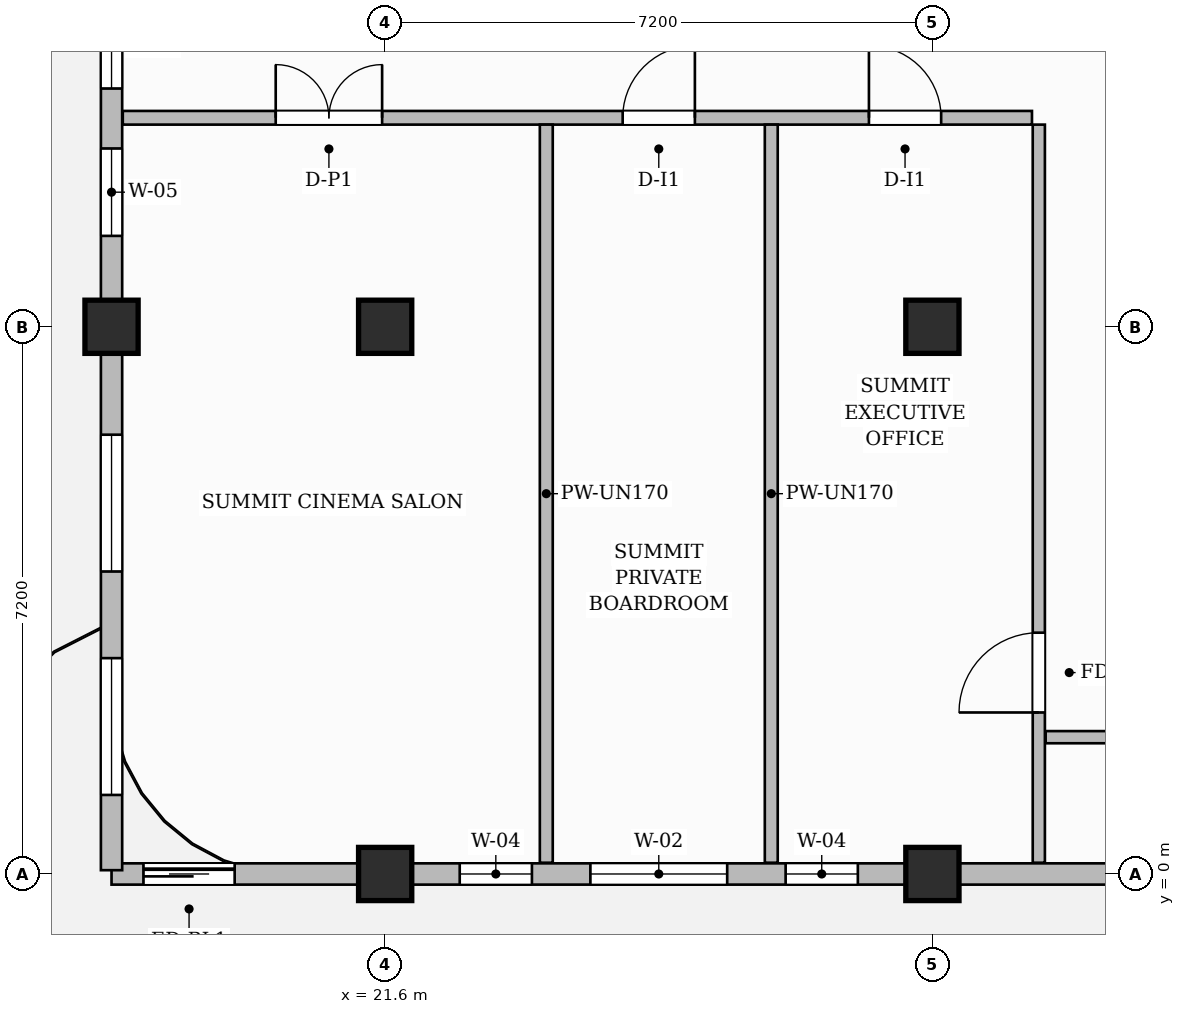
"""IFC4 building model, lengths in metres.
Left out: names, types, materials, properties, quantities, classifications, styles, units other than length and angle.
Written with IfcOpenShell. Run it as: python <this file> out.ifc"""

import sys

from ifc_helpers import new_model, si_unit, direction, frame, frame_2d, origin, origin_2d, place, context, subcontext, project, spatial, rectangle, extrude, source, transform, mapped, element, fill, save


model = new_model("IFC4")
c1 = context("Model", 3, precision=1e-05, world=origin(), true_north=direction((0.0, 1.0)))
c2 = subcontext(c1, "Body", "Model", "MODEL_VIEW")
j1 = project(units=[si_unit("LENGTHUNIT", "METRE"), si_unit("PLANEANGLEUNIT", "RADIAN")], contexts=[c1])
p1 = place(None, origin())
s1 = spatial("IfcSite", under=j1, at=p1, CompositionType="ELEMENT")
p2 = place(p1, origin())
s2 = spatial("IfcBuilding", under=s1, at=p2, CompositionType="ELEMENT")
p3 = place(p2, frame((0.0, 0.0, 275.05)))
s3 = spatial("IfcBuildingStorey", under=s2, at=p3, CompositionType="ELEMENT", Elevation=275.05)
m1 = source(origin(), c2, "Body", "SweptSolid", [
    extrude(rectangle(XDim=0.7, YDim=0.7, at=origin_2d()), origin(), (0.0, 0.0, 1.0), 3.85),
])
for number, where, z_axis, x_axis in (
    (1, (21.6, 0.0, 0.0), (0.0, 0.0, 1.0), (1.0, 0.0, 0.0)),
    (2, (21.6, 7.2, 0.0), (0.0, 0.0, 1.0), (1.0, 0.0, 0.0)),
    (3, (28.8, 0.0, 0.0), (0.0, 0.0, 1.0), (1.0, 0.0, 0.0)),
    (4, (28.8, 7.2, 0.0), (0.0, 0.0, 1.0), (1.0, 0.0, 0.0)),
    (5, (18.0, 7.2, 0.0), (0.0, 0.0, 1.0), (1.0, 0.0, 0.0)),
):
    element("IfcColumn", number, at=place(p3, frame(where, z_axis=z_axis, x_axis=x_axis)), inside=s3, PredefinedType="COLUMN", context=c2, shape_type="MappedRepresentation", body=[
        mapped(m1, transform((0.0, 0.0, 0.0), scale=1.0)),
    ])
p4 = place(p3, frame((18.148, 9.95, 0.0), z_axis=(0.0, 0.0, 1.0), x_axis=(1.0, 0.0, 0.0)))
e6 = element("IfcWall", 6, at=p4, inside=s3, PredefinedType="PARTITIONING", context=c2, shape_type="SweptSolid", body=[
    extrude(rectangle(XDim=11.962, YDim=0.18, at=frame_2d((5.981, 0.0))), origin(), (0.0, 0.0, 1.0), 3.6),
])
p5 = place(p4, frame((2.012, 0.0, 0.0)))
e7 = element("IfcOpeningElement", 7, at=p5, cuts=e6, PredefinedType="OPENING", context=c2, shape_type="SweptSolid", body=[
    extrude(rectangle(XDim=1.4, YDim=2.35, at=frame_2d((0.7, 1.175))), frame((0.0, 0.1, 0.0), z_axis=(0.0, -1.0, 0.0), x_axis=(1.0, 0.0, 0.0)), (0.0, 0.0, 1.0), 0.2),
])
p6 = place(p4, frame((6.577, 0.0, 0.0)))
e8 = element("IfcOpeningElement", 8, at=p6, cuts=e6, PredefinedType="OPENING", context=c2, shape_type="SweptSolid", body=[
    extrude(rectangle(XDim=0.95, YDim=2.15, at=frame_2d((0.475, 1.075))), frame((0.0, 0.1, 0.0), z_axis=(0.0, -1.0, 0.0), x_axis=(1.0, 0.0, 0.0)), (0.0, 0.0, 1.0), 0.2),
])
p7 = place(p4, frame((9.817, 0.0, 0.0)))
e9 = element("IfcOpeningElement", 9, at=p7, cuts=e6, PredefinedType="OPENING", context=c2, shape_type="SweptSolid", body=[
    extrude(rectangle(XDim=0.95, YDim=2.15, at=frame_2d((0.475, 1.075))), frame((0.0, 0.1, 0.0), z_axis=(0.0, -1.0, 0.0), x_axis=(1.0, 0.0, 0.0)), (0.0, 0.0, 1.0), 0.2),
])
p8 = place(p3, frame((30.2, 0.148, 0.0), z_axis=(0.0, 0.0, 1.0), x_axis=(0.0, 1.0, 0.0)))
e10 = element("IfcWall", 10, at=p8, inside=s3, PredefinedType="PARTITIONING", context=c2, shape_type="SweptSolid", body=[
    extrude(rectangle(XDim=9.712, YDim=0.16, at=frame_2d((4.856, 0.0))), origin(), (0.0, 0.0, 1.0), 3.6),
])
p9 = place(p8, frame((1.977, 0.0, 0.0)))
e11 = element("IfcOpeningElement", 11, at=p9, cuts=e10, PredefinedType="OPENING", context=c2, shape_type="SweptSolid", body=[
    extrude(rectangle(XDim=1.05, YDim=2.15, at=frame_2d((0.525, 1.075))), frame((0.0, 0.09, 0.0), z_axis=(0.0, -1.0, 0.0), x_axis=(1.0, 0.0, 0.0)), (0.0, 0.0, 1.0), 0.18),
])
p10 = place(p3, frame((30.29, 1.8, 0.0), z_axis=(0.0, 0.0, 1.0), x_axis=(1.0, 0.0, 0.0)))
e12 = element("IfcWall", 12, at=p10, inside=s3, PredefinedType="PARTITIONING", context=c2, shape_type="SweptSolid", body=[
    extrude(rectangle(XDim=19.37, YDim=0.16, at=frame_2d((9.685, 0.0))), origin(), (0.0, 0.0, 1.0), 3.6),
])
p11 = place(p10, frame((9.735, 0.0, 0.0)))
e13 = element("IfcOpeningElement", 13, at=p11, cuts=e12, PredefinedType="OPENING", context=c2, shape_type="SweptSolid", body=[
    extrude(rectangle(XDim=0.95, YDim=2.15, at=frame_2d((0.475, 1.075))), frame((0.0, 0.09, 0.0), z_axis=(0.0, -1.0, 0.0), x_axis=(1.0, 0.0, 0.0)), (0.0, 0.0, 1.0), 0.18),
])
for number, where, z_axis, x_axis in (
    (14, (23.72, 0.148, 0.0), (0.0, 0.0, 1.0), (0.0, 1.0, 0.0)),
    (15, (26.68, 0.148, 0.0), (0.0, 0.0, 1.0), (0.0, 1.0, 0.0)),
):
    element("IfcWall", number, at=place(p3, frame(where, z_axis=z_axis, x_axis=x_axis)), inside=s3, PredefinedType="PARTITIONING", context=c2, shape_type="SweptSolid", body=[
        extrude(rectangle(XDim=9.712, YDim=0.17, at=frame_2d((4.856, 0.0))), origin(), (0.0, 0.0, 1.0), 3.6),
    ])
p12 = place(p3, frame((18.0, 0.0, 0.0), z_axis=(0.0, 0.0, 1.0), x_axis=(1.0, 0.0, 0.0)))
e16 = element("IfcWall", 16, at=p12, inside=s3, PredefinedType="SOLIDWALL", context=c2, shape_type="SweptSolid", body=[
    extrude(rectangle(XDim=31.8, YDim=0.28, at=frame_2d((15.9, 0.0))), origin(), (0.0, 0.0, 1.0), 3.185),
])
p13 = place(p12, frame((0.42, 0.0, 0.0)))
e17 = element("IfcOpeningElement", 17, at=p13, cuts=e16, PredefinedType="OPENING", context=c2, shape_type="SweptSolid", body=[
    extrude(rectangle(XDim=1.2, YDim=2.2, at=frame_2d((0.6, 1.1))), frame((0.0, 0.15, 0.0), z_axis=(0.0, -1.0, 0.0), x_axis=(1.0, 0.0, 0.0)), (0.0, 0.0, 1.0), 0.3),
])
p14 = place(p12, frame((4.581, 0.0, 0.8)))
e18 = element("IfcOpeningElement", 18, at=p14, cuts=e16, PredefinedType="OPENING", context=c2, shape_type="SweptSolid", body=[
    extrude(rectangle(XDim=0.95, YDim=1.75, at=frame_2d((0.475, 0.875))), frame((0.0, 0.15, 0.0), z_axis=(0.0, -1.0, 0.0), x_axis=(1.0, 0.0, 0.0)), (0.0, 0.0, 1.0), 0.3),
])
p15 = place(p12, frame((6.3, 0.0, 0.8)))
e19 = element("IfcOpeningElement", 19, at=p15, cuts=e16, PredefinedType="OPENING", context=c2, shape_type="SweptSolid", body=[
    extrude(rectangle(XDim=1.8, YDim=1.85, at=frame_2d((0.9, 0.925))), frame((0.0, 0.15, 0.0), z_axis=(0.0, -1.0, 0.0), x_axis=(1.0, 0.0, 0.0)), (0.0, 0.0, 1.0), 0.3),
])
p16 = place(p12, frame((8.869, 0.0, 0.8)))
e20 = element("IfcOpeningElement", 20, at=p16, cuts=e16, PredefinedType="OPENING", context=c2, shape_type="SweptSolid", body=[
    extrude(rectangle(XDim=0.95, YDim=1.75, at=frame_2d((0.475, 0.875))), frame((0.0, 0.15, 0.0), z_axis=(0.0, -1.0, 0.0), x_axis=(1.0, 0.0, 0.0)), (0.0, 0.0, 1.0), 0.3),
])
p17 = place(p12, frame((13.204, 0.0, 0.8)))
e21 = element("IfcOpeningElement", 21, at=p17, cuts=e16, PredefinedType="OPENING", context=c2, shape_type="SweptSolid", body=[
    extrude(rectangle(XDim=1.8, YDim=1.85, at=frame_2d((0.9, 0.925))), frame((0.0, 0.15, 0.0), z_axis=(0.0, -1.0, 0.0), x_axis=(1.0, 0.0, 0.0)), (0.0, 0.0, 1.0), 0.3),
])
p18 = place(p12, frame((18.125, 0.0, 0.8)))
e22 = element("IfcOpeningElement", 22, at=p18, cuts=e16, PredefinedType="OPENING", context=c2, shape_type="SweptSolid", body=[
    extrude(rectangle(XDim=1.8, YDim=1.85, at=frame_2d((0.9, 0.925))), frame((0.0, 0.15, 0.0), z_axis=(0.0, -1.0, 0.0), x_axis=(1.0, 0.0, 0.0)), (0.0, 0.0, 1.0), 0.3),
])
p19 = place(p12, frame((20.875, 0.0, 0.8)))
e23 = element("IfcOpeningElement", 23, at=p19, cuts=e16, PredefinedType="OPENING", context=c2, shape_type="SweptSolid", body=[
    extrude(rectangle(XDim=1.8, YDim=1.85, at=frame_2d((0.9, 0.925))), frame((0.0, 0.15, 0.0), z_axis=(0.0, -1.0, 0.0), x_axis=(1.0, 0.0, 0.0)), (0.0, 0.0, 1.0), 0.3),
])
p20 = place(p12, frame((25.475, 0.0, 0.8)))
e24 = element("IfcOpeningElement", 24, at=p20, cuts=e16, PredefinedType="OPENING", context=c2, shape_type="SweptSolid", body=[
    extrude(rectangle(XDim=1.8, YDim=1.85, at=frame_2d((0.9, 0.925))), frame((0.0, 0.15, 0.0), z_axis=(0.0, -1.0, 0.0), x_axis=(1.0, 0.0, 0.0)), (0.0, 0.0, 1.0), 0.3),
])
p21 = place(p12, frame((28.525, 0.0, 0.8)))
e25 = element("IfcOpeningElement", 25, at=p21, cuts=e16, PredefinedType="OPENING", context=c2, shape_type="SweptSolid", body=[
    extrude(rectangle(XDim=1.8, YDim=1.85, at=frame_2d((0.9, 0.925))), frame((0.0, 0.15, 0.0), z_axis=(0.0, -1.0, 0.0), x_axis=(1.0, 0.0, 0.0)), (0.0, 0.0, 1.0), 0.3),
])
p22 = place(p3, frame((18.0, 0.05, 0.0), z_axis=(0.0, 0.0, 1.0), x_axis=(0.0, 1.0, 0.0)))
e26 = element("IfcWall", 26, at=p22, inside=s3, PredefinedType="SOLIDWALL", context=c2, shape_type="SweptSolid", body=[
    extrude(rectangle(XDim=21.5, YDim=0.28, at=frame_2d((10.75, 0.0))), origin(), (0.0, 0.0, 1.0), 3.6),
])
p23 = place(p22, frame((0.99, 0.0, 0.8)))
e27 = element("IfcOpeningElement", 27, at=p23, cuts=e26, PredefinedType="OPENING", context=c2, shape_type="SweptSolid", body=[
    extrude(rectangle(XDim=1.8, YDim=1.85, at=frame_2d((0.9, 0.925))), frame((0.0, 0.15, 0.0), z_axis=(0.0, -1.0, 0.0), x_axis=(1.0, 0.0, 0.0)), (0.0, 0.0, 1.0), 0.3),
])
p24 = place(p22, frame((3.93, 0.0, 0.8)))
e28 = element("IfcOpeningElement", 28, at=p24, cuts=e26, PredefinedType="OPENING", context=c2, shape_type="SweptSolid", body=[
    extrude(rectangle(XDim=1.8, YDim=1.85, at=frame_2d((0.9, 0.925))), frame((0.0, 0.15, 0.0), z_axis=(0.0, -1.0, 0.0), x_axis=(1.0, 0.0, 0.0)), (0.0, 0.0, 1.0), 0.3),
])
p25 = place(p22, frame((8.346, 0.0, 0.8)))
e29 = element("IfcOpeningElement", 29, at=p25, cuts=e26, PredefinedType="OPENING", context=c2, shape_type="SweptSolid", body=[
    extrude(rectangle(XDim=1.15, YDim=1.8, at=frame_2d((0.575, 0.9))), frame((0.0, 0.15, 0.0), z_axis=(0.0, -1.0, 0.0), x_axis=(1.0, 0.0, 0.0)), (0.0, 0.0, 1.0), 0.3),
])
p26 = place(p22, frame((10.285, 0.0, 0.8)))
e30 = element("IfcOpeningElement", 30, at=p26, cuts=e26, PredefinedType="OPENING", context=c2, shape_type="SweptSolid", body=[
    extrude(rectangle(XDim=1.15, YDim=1.8, at=frame_2d((0.575, 0.9))), frame((0.0, 0.15, 0.0), z_axis=(0.0, -1.0, 0.0), x_axis=(1.0, 0.0, 0.0)), (0.0, 0.0, 1.0), 0.3),
])
p27 = place(p22, frame((12.114, 0.0, 0.8)))
e31 = element("IfcOpeningElement", 31, at=p27, cuts=e26, PredefinedType="OPENING", context=c2, shape_type="SweptSolid", body=[
    extrude(rectangle(XDim=1.15, YDim=1.8, at=frame_2d((0.575, 0.9))), frame((0.0, 0.15, 0.0), z_axis=(0.0, -1.0, 0.0), x_axis=(1.0, 0.0, 0.0)), (0.0, 0.0, 1.0), 0.3),
])
p28 = place(p22, frame((15.406, 0.0, 0.8)))
e32 = element("IfcOpeningElement", 32, at=p28, cuts=e26, PredefinedType="OPENING", context=c2, shape_type="SweptSolid", body=[
    extrude(rectangle(XDim=1.15, YDim=1.8, at=frame_2d((0.575, 0.9))), frame((0.0, 0.15, 0.0), z_axis=(0.0, -1.0, 0.0), x_axis=(1.0, 0.0, 0.0)), (0.0, 0.0, 1.0), 0.3),
])
p29 = place(p22, frame((18.079, 0.0, 0.8)))
e33 = element("IfcOpeningElement", 33, at=p29, cuts=e26, PredefinedType="OPENING", context=c2, shape_type="SweptSolid", body=[
    extrude(rectangle(XDim=1.8, YDim=1.85, at=frame_2d((0.9, 0.925))), frame((0.0, 0.15, 0.0), z_axis=(0.0, -1.0, 0.0), x_axis=(1.0, 0.0, 0.0)), (0.0, 0.0, 1.0), 0.3),
])
m2 = source(origin(), c2, "Body", "SweptSolid", [
    extrude(rectangle(XDim=1.05, YDim=2.15, at=frame_2d((0.525, 1.075))), frame((0.0, 0.025, 0.0), z_axis=(0.0, -1.0, 0.0), x_axis=(1.0, 0.0, 0.0)), (0.0, 0.0, 1.0), 0.05),
])
p30 = place(p9, origin())
e34 = element("IfcDoor", 34, at=p30, inside=s3, OperationType="SINGLE_SWING_LEFT", PredefinedType="DOOR", context=c2, shape_type="MappedRepresentation", body=[
    mapped(m2, transform((0.0, 0.0, 0.0), scale=1.0)),
])
fill(e11, e34)
m3 = source(origin(), c2, "Body", "SweptSolid", [
    extrude(rectangle(XDim=1.4, YDim=2.35, at=frame_2d((0.7, 1.175))), frame((0.0, 0.025, 0.0), z_axis=(0.0, -1.0, 0.0), x_axis=(1.0, 0.0, 0.0)), (0.0, 0.0, 1.0), 0.05),
])
p31 = place(p5, origin())
e35 = element("IfcDoor", 35, at=p31, inside=s3, OperationType="DOUBLE_DOOR_SINGLE_SWING", PredefinedType="DOOR", context=c2, shape_type="MappedRepresentation", body=[
    mapped(m3, transform((0.0, 0.0, 0.0), scale=1.0)),
])
fill(e7, e35)
m4 = source(origin(), c2, "Body", "SweptSolid", [
    extrude(rectangle(XDim=0.95, YDim=2.15, at=frame_2d((0.475, 1.075))), frame((0.0, 0.025, 0.0), z_axis=(0.0, -1.0, 0.0), x_axis=(1.0, 0.0, 0.0)), (0.0, 0.0, 1.0), 0.05),
])
p32 = place(p6, origin())
e36 = element("IfcDoor", 36, at=p32, inside=s3, OperationType="SINGLE_SWING_RIGHT", PredefinedType="DOOR", context=c2, shape_type="MappedRepresentation", body=[
    mapped(m4, transform((0.0, 0.0, 0.0), scale=1.0)),
])
fill(e8, e36)
p33 = place(p7, origin())
e37 = element("IfcDoor", 37, at=p33, inside=s3, OperationType="SINGLE_SWING_LEFT", PredefinedType="DOOR", context=c2, shape_type="MappedRepresentation", body=[
    mapped(m4, transform((0.0, 0.0, 0.0), scale=1.0)),
])
fill(e9, e37)
m5 = source(origin(), c2, "Body", "SweptSolid", [
    extrude(rectangle(XDim=1.2, YDim=2.2, at=frame_2d((0.6, 1.1))), frame((0.0, 0.025, 0.0), z_axis=(0.0, -1.0, 0.0), x_axis=(1.0, 0.0, 0.0)), (0.0, 0.0, 1.0), 0.05),
])
p34 = place(p13, origin())
e38 = element("IfcDoor", 38, at=p34, inside=s3, OperationType="SLIDING_TO_LEFT", PredefinedType="DOOR", context=c2, shape_type="MappedRepresentation", body=[
    mapped(m5, transform((0.0, 0.0, 0.0), scale=1.0)),
])
fill(e17, e38)
m6 = source(origin(), c2, "Body", "SweptSolid", [
    extrude(rectangle(XDim=0.95, YDim=1.75, at=frame_2d((0.475, 0.875))), frame((0.0, 0.03, 0.0), z_axis=(0.0, -1.0, 0.0), x_axis=(1.0, 0.0, 0.0)), (0.0, 0.0, 1.0), 0.06),
])
p35 = place(p14, origin())
e39 = element("IfcWindow", 39, at=p35, inside=s3, PartitioningType="SINGLE_PANEL", PredefinedType="WINDOW", context=c2, shape_type="MappedRepresentation", body=[
    mapped(m6, transform((0.0, 0.0, 0.0), scale=1.0)),
])
fill(e18, e39)
m7 = source(origin(), c2, "Body", "SweptSolid", [
    extrude(rectangle(XDim=1.8, YDim=1.85, at=frame_2d((0.9, 0.925))), frame((0.0, 0.03, 0.0), z_axis=(0.0, -1.0, 0.0), x_axis=(1.0, 0.0, 0.0)), (0.0, 0.0, 1.0), 0.06),
])
p36 = place(p15, origin())
e40 = element("IfcWindow", 40, at=p36, inside=s3, PartitioningType="DOUBLE_PANEL_VERTICAL", PredefinedType="WINDOW", context=c2, shape_type="MappedRepresentation", body=[
    mapped(m7, transform((0.0, 0.0, 0.0), scale=1.0)),
])
fill(e19, e40)
p37 = place(p16, origin())
e41 = element("IfcWindow", 41, at=p37, inside=s3, PartitioningType="SINGLE_PANEL", PredefinedType="WINDOW", context=c2, shape_type="MappedRepresentation", body=[
    mapped(m6, transform((0.0, 0.0, 0.0), scale=1.0)),
])
fill(e20, e41)
p38 = place(p23, origin())
e42 = element("IfcWindow", 42, at=p38, inside=s3, PartitioningType="DOUBLE_PANEL_VERTICAL", PredefinedType="WINDOW", context=c2, shape_type="MappedRepresentation", body=[
    mapped(m7, transform((0.0, 0.0, 0.0), scale=1.0)),
])
fill(e27, e42)
p39 = place(p24, origin())
e43 = element("IfcWindow", 43, at=p39, inside=s3, PartitioningType="DOUBLE_PANEL_VERTICAL", PredefinedType="WINDOW", context=c2, shape_type="MappedRepresentation", body=[
    mapped(m7, transform((0.0, 0.0, 0.0), scale=1.0)),
])
fill(e28, e43)
m8 = source(origin(), c2, "Body", "SweptSolid", [
    extrude(rectangle(XDim=1.15, YDim=1.8, at=frame_2d((0.575, 0.9))), frame((0.0, 0.03, 0.0), z_axis=(0.0, -1.0, 0.0), x_axis=(1.0, 0.0, 0.0)), (0.0, 0.0, 1.0), 0.06),
])
p40 = place(p25, origin())
e44 = element("IfcWindow", 44, at=p40, inside=s3, PartitioningType="SINGLE_PANEL", PredefinedType="WINDOW", context=c2, shape_type="MappedRepresentation", body=[
    mapped(m8, transform((0.0, 0.0, 0.0), scale=1.0)),
])
fill(e29, e44)
p41 = place(p26, origin())
e45 = element("IfcWindow", 45, at=p41, inside=s3, PartitioningType="SINGLE_PANEL", PredefinedType="WINDOW", context=c2, shape_type="MappedRepresentation", body=[
    mapped(m8, transform((0.0, 0.0, 0.0), scale=1.0)),
])
fill(e30, e45)
save(model, sys.argv[1])
